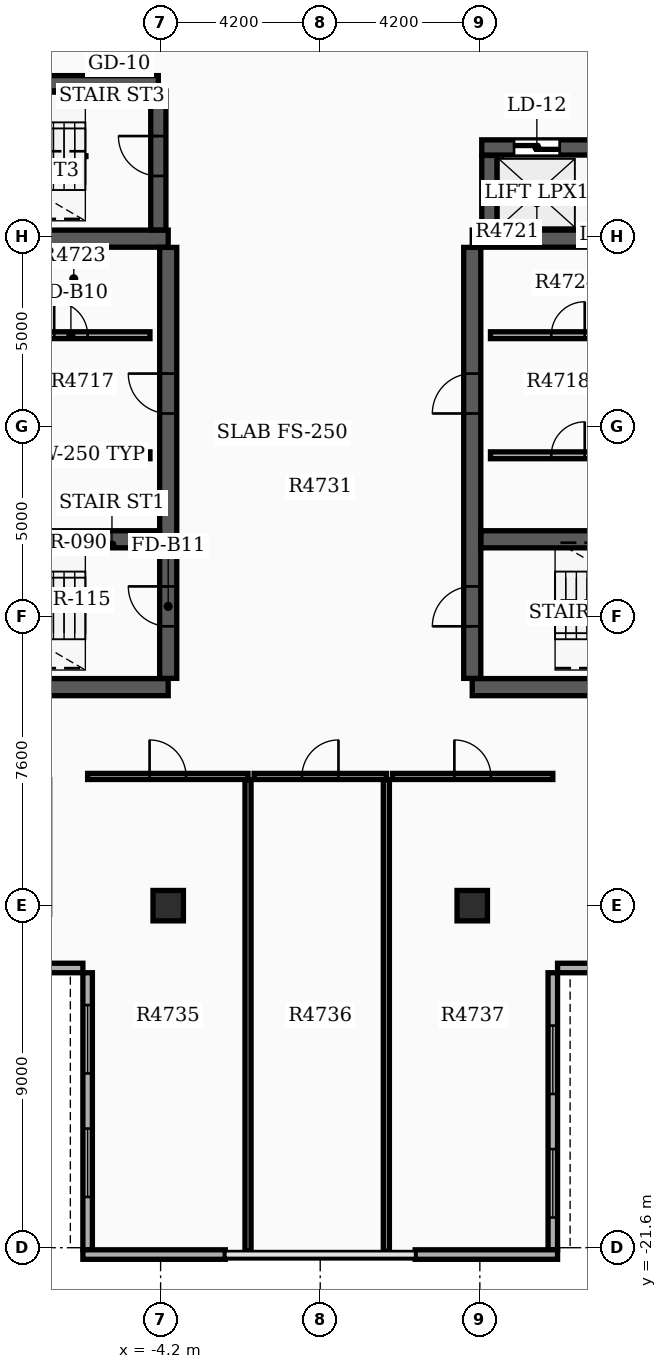
"""IFC4 building model, lengths in metres.
Left out: names, types, materials, properties, quantities, classifications, styles, units other than length and angle.
Written with IfcOpenShell. Run it as: python <this file> out.ifc"""

import sys

from ifc_helpers import new_model, si_unit, direction, frame, frame_2d, origin, origin_2d, place, context, subcontext, project, spatial, rectangle, extrude, element, fill, save


model = new_model("IFC4")
c1 = context("Model", 3, precision=1e-05, world=origin(), true_north=direction((0.0, 1.0)))
c2 = subcontext(c1, "Body", "Model", "MODEL_VIEW")
j1 = project(units=[si_unit("LENGTHUNIT", "METRE"), si_unit("PLANEANGLEUNIT", "RADIAN")], contexts=[c1])
p1 = place(None, origin())
s1 = spatial("IfcSite", under=j1, at=p1, CompositionType="ELEMENT")
p2 = place(p1, origin())
s2 = spatial("IfcBuilding", under=s1, at=p2, CompositionType="ELEMENT")
p3 = place(p2, frame((0.0, 0.0, 308.4)))
s3 = spatial("IfcBuildingStorey", under=s2, at=p3, CompositionType="ELEMENT", Elevation=308.4)
for number, where, z_axis, x_axis in (
    (1, (-12.4, -6.85, 0.0), (0.0, 0.0, 1.0), (1.0, 0.0, 0.0)),
    (2, (-12.4, 4.95, 0.0), (0.0, 0.0, 1.0), (1.0, 0.0, 0.0)),
):
    element("IfcWall", number, at=place(p3, frame(where, z_axis=z_axis, x_axis=x_axis)), inside=s3, PredefinedType="SHEAR", context=c2, shape_type="SweptSolid", body=[
        extrude(rectangle(XDim=8.4, YDim=0.45, at=frame_2d((4.2, 0.0))), origin(), (0.0, 0.0, 1.0), 4.25),
    ])
p4 = place(p3, frame((-4.0, -6.62, 0.0), z_axis=(0.0, 0.0, 1.0), x_axis=(0.0, 1.0, 0.0)))
e3 = element("IfcWall", 3, at=p4, inside=s3, PredefinedType="SHEAR", context=c2, shape_type="SweptSolid", body=[
    extrude(rectangle(XDim=11.34, YDim=0.45, at=frame_2d((5.67, 0.0))), origin(), (0.0, 0.0, 1.0), 4.25),
])
p5 = place(p4, frame((1.37, 0.0, 0.0)))
e4 = element("IfcOpeningElement", 4, at=p5, cuts=e3, PredefinedType="OPENING", context=c2, shape_type="SweptSolid", body=[
    extrude(rectangle(XDim=1.05, YDim=2.15, at=frame_2d((0.525, 1.075))), frame((0.0, 0.235, 0.0), z_axis=(0.0, -1.0, 0.0), x_axis=(1.0, 0.0, 0.0)), (0.0, 0.0, 1.0), 0.47),
])
p6 = place(p4, frame((6.97, 0.0, 0.0)))
e5 = element("IfcOpeningElement", 5, at=p6, cuts=e3, PredefinedType="OPENING", context=c2, shape_type="SweptSolid", body=[
    extrude(rectangle(XDim=1.05, YDim=2.15, at=frame_2d((0.525, 1.075))), frame((0.0, 0.235, 0.0), z_axis=(0.0, -1.0, 0.0), x_axis=(1.0, 0.0, 0.0)), (0.0, 0.0, 1.0), 0.47),
])
p7 = place(p3, frame((-12.17, -2.96, 0.0), z_axis=(0.0, 0.0, 1.0), x_axis=(1.0, 0.0, 0.0)))
e6 = element("IfcWall", 6, at=p7, inside=s3, PredefinedType="SHEAR", context=c2, shape_type="SweptSolid", body=[
    extrude(rectangle(XDim=7.94, YDim=0.45, at=frame_2d((3.97, 0.0))), origin(), (0.0, 0.0, 1.0), 4.25),
])
for number, where, z_axis, x_axis in (
    (7, (4.0, -6.85, 0.0), (0.0, 0.0, 1.0), (1.0, 0.0, 0.0)),
    (8, (4.0, 4.95, 0.0), (0.0, 0.0, 1.0), (1.0, 0.0, 0.0)),
):
    element("IfcWall", number, at=place(p3, frame(where, z_axis=z_axis, x_axis=x_axis)), inside=s3, PredefinedType="SHEAR", context=c2, shape_type="SweptSolid", body=[
        extrude(rectangle(XDim=8.4, YDim=0.45, at=frame_2d((4.2, 0.0))), origin(), (0.0, 0.0, 1.0), 4.25),
    ])
p8 = place(p3, frame((4.0, -6.62, 0.0), z_axis=(0.0, 0.0, 1.0), x_axis=(0.0, 1.0, 0.0)))
e9 = element("IfcWall", 9, at=p8, inside=s3, PredefinedType="SHEAR", context=c2, shape_type="SweptSolid", body=[
    extrude(rectangle(XDim=11.34, YDim=0.45, at=frame_2d((5.67, 0.0))), origin(), (0.0, 0.0, 1.0), 4.25),
])
p9 = place(p8, frame((1.37, 0.0, 0.0)))
e10 = element("IfcOpeningElement", 10, at=p9, cuts=e9, PredefinedType="OPENING", context=c2, shape_type="SweptSolid", body=[
    extrude(rectangle(XDim=1.05, YDim=2.15, at=frame_2d((0.525, 1.075))), frame((0.0, 0.235, 0.0), z_axis=(0.0, -1.0, 0.0), x_axis=(1.0, 0.0, 0.0)), (0.0, 0.0, 1.0), 0.47),
])
p10 = place(p8, frame((6.97, 0.0, 0.0)))
e11 = element("IfcOpeningElement", 11, at=p10, cuts=e9, PredefinedType="OPENING", context=c2, shape_type="SweptSolid", body=[
    extrude(rectangle(XDim=1.05, YDim=2.15, at=frame_2d((0.525, 1.075))), frame((0.0, 0.235, 0.0), z_axis=(0.0, -1.0, 0.0), x_axis=(1.0, 0.0, 0.0)), (0.0, 0.0, 1.0), 0.47),
])
p11 = place(p3, frame((4.23, -2.96, 0.0), z_axis=(0.0, 0.0, 1.0), x_axis=(1.0, 0.0, 0.0)))
e12 = element("IfcWall", 12, at=p11, inside=s3, PredefinedType="SHEAR", context=c2, shape_type="SweptSolid", body=[
    extrude(rectangle(XDim=7.94, YDim=0.45, at=frame_2d((3.97, 0.0))), origin(), (0.0, 0.0, 1.0), 4.25),
])
p12 = place(p3, frame((-12.22, 9.04, 0.0), z_axis=(0.0, 0.0, 1.0), x_axis=(1.0, 0.0, 0.0)))
e13 = element("IfcWall", 13, at=p12, inside=s3, PredefinedType="SHEAR", context=c2, shape_type="SweptSolid", body=[
    extrude(rectangle(XDim=7.96, YDim=0.4, at=frame_2d((3.98, 0.0))), origin(), (0.0, 0.0, 1.0), 4.25),
])
p13 = place(p3, frame((-4.26, 5.18, 0.0), z_axis=(0.0, 0.0, 1.0), x_axis=(0.0, 1.0, 0.0)))
e14 = element("IfcWall", 14, at=p13, inside=s3, PredefinedType="SHEAR", context=c2, shape_type="SweptSolid", body=[
    extrude(rectangle(XDim=3.655, YDim=0.4, at=frame_2d((1.828, 0.0))), origin(), (0.0, 0.0, 1.0), 4.25),
])
p14 = place(p13, frame((1.42, 0.0, 0.0)))
e15 = element("IfcOpeningElement", 15, at=p14, cuts=e14, PredefinedType="OPENING", context=c2, shape_type="SweptSolid", body=[
    extrude(rectangle(XDim=1.05, YDim=2.15, at=frame_2d((0.525, 1.075))), frame((0.0, 0.21, 0.0), z_axis=(0.0, -1.0, 0.0), x_axis=(1.0, 0.0, 0.0)), (0.0, 0.0, 1.0), 0.42),
])
p15 = place(p3, frame((4.45, 5.18, 0.0), z_axis=(0.0, 0.0, 1.0), x_axis=(0.0, 1.0, 0.0)))
e16 = element("IfcWall", 16, at=p15, inside=s3, PredefinedType="SHEAR", context=c2, shape_type="SweptSolid", body=[
    extrude(rectangle(XDim=1.96, YDim=0.4, at=frame_2d((0.98, 0.0))), origin(), (0.0, 0.0, 1.0), 4.25),
])
p16 = place(p3, frame((4.25, 7.35, 0.0), z_axis=(0.0, 0.0, 1.0), x_axis=(1.0, 0.0, 0.0)))
e17 = element("IfcWall", 17, at=p16, inside=s3, PredefinedType="SHEAR", context=c2, shape_type="SweptSolid", body=[
    extrude(rectangle(XDim=5.4, YDim=0.4, at=frame_2d((2.7, 0.0))), origin(), (0.0, 0.0, 1.0), 4.25),
])
p17 = place(p16, frame((0.85, 0.0, 0.0)))
e18 = element("IfcOpeningElement", 18, at=p17, cuts=e17, PredefinedType="OPENING", context=c2, shape_type="SweptSolid", body=[
    extrude(rectangle(XDim=1.2, YDim=2.2, at=frame_2d((0.6, 1.1))), frame((0.0, 0.21, 0.0), z_axis=(0.0, -1.0, 0.0), x_axis=(1.0, 0.0, 0.0)), (0.0, 0.0, 1.0), 0.42),
])
p18 = place(p16, frame((3.25, 0.0, 0.0)))
e19 = element("IfcOpeningElement", 19, at=p18, cuts=e17, PredefinedType="OPENING", context=c2, shape_type="SweptSolid", body=[
    extrude(rectangle(XDim=1.2, YDim=2.2, at=frame_2d((0.6, 1.1))), frame((0.0, 0.21, 0.0), z_axis=(0.0, -1.0, 0.0), x_axis=(1.0, 0.0, 0.0)), (0.0, 0.0, 1.0), 0.42),
])
for number, where, z_axis, x_axis in (
    (20, (-4.0, -12.6, 0.0), (0.0, 0.0, 1.0), (1.0, 0.0, 0.0)),
    (21, (4.0, -12.6, 0.0), (0.0, 0.0, 1.0), (1.0, 0.0, 0.0)),
):
    element("IfcColumn", number, at=place(p3, frame(where, z_axis=z_axis, x_axis=x_axis)), inside=s3, PredefinedType="COLUMN", context=c2, shape_type="SweptSolid", body=[
        extrude(rectangle(XDim=0.8, YDim=0.8, at=origin_2d()), origin(), (0.0, 0.0, 1.0), 4.5),
    ])
p19 = place(p3, frame((-6.12, -14.365, 0.0), z_axis=(0.0, 0.0, 1.0), x_axis=(0.0, -1.0, 0.0)))
e22 = element("IfcWall", 22, at=p19, inside=s3, PredefinedType="STANDARD", context=c2, shape_type="SweptSolid", body=[
    extrude(rectangle(XDim=7.29, YDim=0.25, at=frame_2d((3.645, 0.0))), origin(), (0.0, 0.0, 1.0), 3.73),
])
p20 = place(p19, frame((0.85, 0.0, 0.8)))
e23 = element("IfcOpeningElement", 23, at=p20, cuts=e22, PredefinedType="OPENING", context=c2, shape_type="SweptSolid", body=[
    extrude(rectangle(XDim=1.8, YDim=1.8, at=frame_2d((0.9, 0.9))), frame((0.0, 0.135, 0.0), z_axis=(0.0, -1.0, 0.0), x_axis=(1.0, 0.0, 0.0)), (0.0, 0.0, 1.0), 0.27),
])
p21 = place(p19, frame((4.1, 0.0, 0.8)))
e24 = element("IfcOpeningElement", 24, at=p21, cuts=e22, PredefinedType="OPENING", context=c2, shape_type="SweptSolid", body=[
    extrude(rectangle(XDim=1.8, YDim=1.8, at=frame_2d((0.9, 0.9))), frame((0.0, 0.135, 0.0), z_axis=(0.0, -1.0, 0.0), x_axis=(1.0, 0.0, 0.0)), (0.0, 0.0, 1.0), 0.27),
])
p22 = place(p3, frame((6.12, -21.655, 0.0), z_axis=(0.0, 0.0, 1.0), x_axis=(0.0, 1.0, 0.0)))
e25 = element("IfcWall", 25, at=p22, inside=s3, PredefinedType="STANDARD", context=c2, shape_type="SweptSolid", body=[
    extrude(rectangle(XDim=7.29, YDim=0.25, at=frame_2d((3.645, 0.0))), origin(), (0.0, 0.0, 1.0), 3.73),
])
p23 = place(p22, frame((0.85, 0.0, 0.8)))
e26 = element("IfcOpeningElement", 26, at=p23, cuts=e25, PredefinedType="OPENING", context=c2, shape_type="SweptSolid", body=[
    extrude(rectangle(XDim=1.8, YDim=1.8, at=frame_2d((0.9, 0.9))), frame((0.0, 0.135, 0.0), z_axis=(0.0, -1.0, 0.0), x_axis=(1.0, 0.0, 0.0)), (0.0, 0.0, 1.0), 0.27),
])
p24 = place(p22, frame((4.1, 0.0, 0.8)))
e27 = element("IfcOpeningElement", 27, at=p24, cuts=e25, PredefinedType="OPENING", context=c2, shape_type="SweptSolid", body=[
    extrude(rectangle(XDim=1.8, YDim=1.8, at=frame_2d((0.9, 0.9))), frame((0.0, 0.135, 0.0), z_axis=(0.0, -1.0, 0.0), x_axis=(1.0, 0.0, 0.0)), (0.0, 0.0, 1.0), 0.27),
])
for number, where, z_axis, x_axis in (
    (28, (-6.245, -21.78, 0.0), (0.0, 0.0, 1.0), (1.0, 0.0, 0.0)),
    (29, (2.498, -21.78, 0.0), (0.0, 0.0, 1.0), (1.0, 0.0, 0.0)),
):
    element("IfcWall", number, at=place(p3, frame(where, z_axis=z_axis, x_axis=x_axis)), inside=s3, PredefinedType="STANDARD", context=c2, shape_type="SweptSolid", body=[
        extrude(rectangle(XDim=3.747, YDim=0.25, at=frame_2d((1.874, 0.0))), origin(), (0.0, 0.0, 1.0), 3.73),
    ])
for number, where, z_axis, x_axis in (
    (30, (-12.615, -14.24, 0.0), (0.0, 0.0, 1.0), (1.0, 0.0, 0.0)),
    (31, (12.615, -14.24, 0.0), (0.0, 0.0, 1.0), (-1.0, 0.0, 0.0)),
):
    element("IfcWall", number, at=place(p3, frame(where, z_axis=z_axis, x_axis=x_axis)), inside=s3, PredefinedType="STANDARD", context=c2, shape_type="SweptSolid", body=[
        extrude(rectangle(XDim=6.37, YDim=0.25, at=frame_2d((3.185, 0.0))), origin(), (0.0, 0.0, 1.0), 3.73),
    ])
p25 = place(p3, frame((-11.9, 2.41, 0.0), z_axis=(0.0, 0.0, 1.0), x_axis=(1.0, 0.0, 0.0)))
e32 = element("IfcWall", 32, at=p25, inside=s3, PredefinedType="SOLIDWALL", context=c2, shape_type="SweptSolid", body=[
    extrude(rectangle(XDim=7.42, YDim=0.18, at=frame_2d((3.71, 0.0))), origin(), (0.0, 0.0, 1.0), 3.72),
])
p26 = place(p25, frame((0.55, 0.0, 0.0)))
e33 = element("IfcOpeningElement", 33, at=p26, cuts=e32, PredefinedType="OPENING", context=c2, shape_type="SweptSolid", body=[
    extrude(rectangle(XDim=1.1, YDim=2.15, at=frame_2d((0.55, 1.075))), frame((0.0, 0.1, 0.0), z_axis=(0.0, -1.0, 0.0), x_axis=(1.0, 0.0, 0.0)), (0.0, 0.0, 1.0), 0.2),
])
p27 = place(p25, frame((4.9, 0.0, 0.0)))
e34 = element("IfcOpeningElement", 34, at=p27, cuts=e32, PredefinedType="OPENING", context=c2, shape_type="SweptSolid", body=[
    extrude(rectangle(XDim=0.88, YDim=2.1, at=frame_2d((0.44, 1.05))), frame((0.0, 0.1, 0.0), z_axis=(0.0, -1.0, 0.0), x_axis=(1.0, 0.0, 0.0)), (0.0, 0.0, 1.0), 0.2),
])
p28 = place(p3, frame((4.48, 2.41, 0.0), z_axis=(0.0, 0.0, 1.0), x_axis=(1.0, 0.0, 0.0)))
e35 = element("IfcWall", 35, at=p28, inside=s3, PredefinedType="SOLIDWALL", context=c2, shape_type="SweptSolid", body=[
    extrude(rectangle(XDim=7.42, YDim=0.18, at=frame_2d((3.71, 0.0))), origin(), (0.0, 0.0, 1.0), 3.72),
])
p29 = place(p28, frame((5.67, 0.0, 0.0)))
e36 = element("IfcOpeningElement", 36, at=p29, cuts=e35, PredefinedType="OPENING", context=c2, shape_type="SweptSolid", body=[
    extrude(rectangle(XDim=1.1, YDim=2.15, at=frame_2d((0.55, 1.075))), frame((0.0, 0.1, 0.0), z_axis=(0.0, -1.0, 0.0), x_axis=(1.0, 0.0, 0.0)), (0.0, 0.0, 1.0), 0.2),
])
p30 = place(p28, frame((1.6, 0.0, 0.0)))
e37 = element("IfcOpeningElement", 37, at=p30, cuts=e35, PredefinedType="OPENING", context=c2, shape_type="SweptSolid", body=[
    extrude(rectangle(XDim=0.88, YDim=2.1, at=frame_2d((0.44, 1.05))), frame((0.0, 0.1, 0.0), z_axis=(0.0, -1.0, 0.0), x_axis=(1.0, 0.0, 0.0)), (0.0, 0.0, 1.0), 0.2),
])
p31 = place(p3, frame((-11.9, -0.75, 0.0), z_axis=(0.0, 0.0, 1.0), x_axis=(1.0, 0.0, 0.0)))
e38 = element("IfcWall", 38, at=p31, inside=s3, PredefinedType="SOLIDWALL", context=c2, shape_type="SweptSolid", body=[
    extrude(rectangle(XDim=7.42, YDim=0.18, at=frame_2d((3.71, 0.0))), origin(), (0.0, 0.0, 1.0), 3.72),
])
p32 = place(p31, frame((1.6, 0.0, 0.0)))
e39 = element("IfcOpeningElement", 39, at=p32, cuts=e38, PredefinedType="OPENING", context=c2, shape_type="SweptSolid", body=[
    extrude(rectangle(XDim=0.88, YDim=2.1, at=frame_2d((0.44, 1.05))), frame((0.0, 0.1, 0.0), z_axis=(0.0, -1.0, 0.0), x_axis=(1.0, 0.0, 0.0)), (0.0, 0.0, 1.0), 0.2),
])
p33 = place(p3, frame((4.48, -0.75, 0.0), z_axis=(0.0, 0.0, 1.0), x_axis=(1.0, 0.0, 0.0)))
e40 = element("IfcWall", 40, at=p33, inside=s3, PredefinedType="SOLIDWALL", context=c2, shape_type="SweptSolid", body=[
    extrude(rectangle(XDim=7.42, YDim=0.18, at=frame_2d((3.71, 0.0))), origin(), (0.0, 0.0, 1.0), 3.72),
])
p34 = place(p33, frame((1.6, 0.0, 0.0)))
e41 = element("IfcOpeningElement", 41, at=p34, cuts=e40, PredefinedType="OPENING", context=c2, shape_type="SweptSolid", body=[
    extrude(rectangle(XDim=0.88, YDim=2.1, at=frame_2d((0.44, 1.05))), frame((0.0, 0.1, 0.0), z_axis=(0.0, -1.0, 0.0), x_axis=(1.0, 0.0, 0.0)), (0.0, 0.0, 1.0), 0.2),
])
p35 = place(p3, frame((-6.12, -9.2, 0.0), z_axis=(0.0, 0.0, 1.0), x_axis=(1.0, 0.0, 0.0)))
e42 = element("IfcWall", 42, at=p35, inside=s3, PredefinedType="PARTITIONING", context=c2, shape_type="SweptSolid", body=[
    extrude(rectangle(XDim=4.22, YDim=0.16, at=frame_2d((2.11, 0.0))), origin(), (0.0, 0.0, 1.0), 3.72),
])
p36 = place(p35, frame((1.63, 0.0, 0.0)))
e43 = element("IfcOpeningElement", 43, at=p36, cuts=e42, PredefinedType="OPENING", context=c2, shape_type="SweptSolid", body=[
    extrude(rectangle(XDim=0.96, YDim=2.15, at=frame_2d((0.48, 1.075))), frame((0.0, 0.09, 0.0), z_axis=(0.0, -1.0, 0.0), x_axis=(1.0, 0.0, 0.0)), (0.0, 0.0, 1.0), 0.18),
])
p37 = place(p3, frame((-1.9, -21.695, 0.0), z_axis=(0.0, 0.0, 1.0), x_axis=(0.0, 1.0, 0.0)))
e44 = element("IfcWall", 44, at=p37, inside=s3, PredefinedType="PARTITIONING", context=c2, shape_type="SweptSolid", body=[
    extrude(rectangle(XDim=12.41, YDim=0.16, at=frame_2d((6.205, 0.0))), origin(), (0.0, 0.0, 1.0), 3.72),
])
p38 = place(p3, frame((-1.74, -9.2, 0.0), z_axis=(0.0, 0.0, 1.0), x_axis=(1.0, 0.0, 0.0)))
e45 = element("IfcWall", 45, at=p38, inside=s3, PredefinedType="PARTITIONING", context=c2, shape_type="SweptSolid", body=[
    extrude(rectangle(XDim=3.48, YDim=0.16, at=frame_2d((1.74, 0.0))), origin(), (0.0, 0.0, 1.0), 3.72),
])
p39 = place(p38, frame((1.26, 0.0, 0.0)))
e46 = element("IfcOpeningElement", 46, at=p39, cuts=e45, PredefinedType="OPENING", context=c2, shape_type="SweptSolid", body=[
    extrude(rectangle(XDim=0.96, YDim=2.15, at=frame_2d((0.48, 1.075))), frame((0.0, 0.09, 0.0), z_axis=(0.0, -1.0, 0.0), x_axis=(1.0, 0.0, 0.0)), (0.0, 0.0, 1.0), 0.18),
])
p40 = place(p3, frame((1.74, -21.695, 0.0), z_axis=(0.0, 0.0, 1.0), x_axis=(0.0, 1.0, 0.0)))
e47 = element("IfcWall", 47, at=p40, inside=s3, PredefinedType="PARTITIONING", context=c2, shape_type="SweptSolid", body=[
    extrude(rectangle(XDim=12.41, YDim=0.16, at=frame_2d((6.205, 0.0))), origin(), (0.0, 0.0, 1.0), 3.72),
])
p41 = place(p3, frame((1.9, -9.2, 0.0), z_axis=(0.0, 0.0, 1.0), x_axis=(1.0, 0.0, 0.0)))
e48 = element("IfcWall", 48, at=p41, inside=s3, PredefinedType="PARTITIONING", context=c2, shape_type="SweptSolid", body=[
    extrude(rectangle(XDim=4.22, YDim=0.16, at=frame_2d((2.11, 0.0))), origin(), (0.0, 0.0, 1.0), 3.72),
])
p42 = place(p41, frame((1.63, 0.0, 0.0)))
e49 = element("IfcOpeningElement", 49, at=p42, cuts=e48, PredefinedType="OPENING", context=c2, shape_type="SweptSolid", body=[
    extrude(rectangle(XDim=0.96, YDim=2.15, at=frame_2d((0.48, 1.075))), frame((0.0, 0.09, 0.0), z_axis=(0.0, -1.0, 0.0), x_axis=(1.0, 0.0, 0.0)), (0.0, 0.0, 1.0), 0.18),
])
p43 = place(p20, origin())
e50 = element("IfcWindow", 50, at=p43, inside=s3, PartitioningType="SINGLE_PANEL", PredefinedType="WINDOW", context=c2, shape_type="SweptSolid", body=[
    extrude(rectangle(XDim=1.8, YDim=1.8, at=frame_2d((0.9, 0.9))), frame((0.0, 0.03, 0.0), z_axis=(0.0, -1.0, 0.0), x_axis=(1.0, 0.0, 0.0)), (0.0, 0.0, 1.0), 0.06),
])
fill(e23, e50)
p44 = place(p21, origin())
e51 = element("IfcWindow", 51, at=p44, inside=s3, PartitioningType="SINGLE_PANEL", PredefinedType="WINDOW", context=c2, shape_type="SweptSolid", body=[
    extrude(rectangle(XDim=1.8, YDim=1.8, at=frame_2d((0.9, 0.9))), frame((0.0, 0.03, 0.0), z_axis=(0.0, -1.0, 0.0), x_axis=(1.0, 0.0, 0.0)), (0.0, 0.0, 1.0), 0.06),
])
fill(e24, e51)
p45 = place(p23, origin())
e52 = element("IfcWindow", 52, at=p45, inside=s3, PartitioningType="SINGLE_PANEL", PredefinedType="WINDOW", context=c2, shape_type="SweptSolid", body=[
    extrude(rectangle(XDim=1.8, YDim=1.8, at=frame_2d((0.9, 0.9))), frame((0.0, 0.03, 0.0), z_axis=(0.0, -1.0, 0.0), x_axis=(1.0, 0.0, 0.0)), (0.0, 0.0, 1.0), 0.06),
])
fill(e26, e52)
p46 = place(p24, origin())
e53 = element("IfcWindow", 53, at=p46, inside=s3, PartitioningType="SINGLE_PANEL", PredefinedType="WINDOW", context=c2, shape_type="SweptSolid", body=[
    extrude(rectangle(XDim=1.8, YDim=1.8, at=frame_2d((0.9, 0.9))), frame((0.0, 0.03, 0.0), z_axis=(0.0, -1.0, 0.0), x_axis=(1.0, 0.0, 0.0)), (0.0, 0.0, 1.0), 0.06),
])
fill(e27, e53)
p47 = place(p5, origin())
e54 = element("IfcDoor", 54, at=p47, inside=s3, OperationType="SINGLE_SWING_RIGHT", PredefinedType="DOOR", context=c2, shape_type="SweptSolid", body=[
    extrude(rectangle(XDim=1.05, YDim=2.15, at=frame_2d((0.525, 1.075))), frame((0.0, 0.025, 0.0), z_axis=(0.0, -1.0, 0.0), x_axis=(1.0, 0.0, 0.0)), (0.0, 0.0, 1.0), 0.05),
])
fill(e4, e54)
p48 = place(p9, origin())
e55 = element("IfcDoor", 55, at=p48, inside=s3, OperationType="SINGLE_SWING_LEFT", PredefinedType="DOOR", context=c2, shape_type="SweptSolid", body=[
    extrude(rectangle(XDim=1.05, YDim=2.15, at=frame_2d((0.525, 1.075))), frame((0.0, 0.025, 0.0), z_axis=(0.0, -1.0, 0.0), x_axis=(1.0, 0.0, 0.0)), (0.0, 0.0, 1.0), 0.05),
])
fill(e10, e55)
p49 = place(p6, origin())
e56 = element("IfcDoor", 56, at=p49, inside=s3, OperationType="SINGLE_SWING_RIGHT", PredefinedType="DOOR", context=c2, shape_type="SweptSolid", body=[
    extrude(rectangle(XDim=1.05, YDim=2.15, at=frame_2d((0.525, 1.075))), frame((0.0, 0.025, 0.0), z_axis=(0.0, -1.0, 0.0), x_axis=(1.0, 0.0, 0.0)), (0.0, 0.0, 1.0), 0.05),
])
fill(e5, e56)
p50 = place(p10, origin())
e57 = element("IfcDoor", 57, at=p50, inside=s3, OperationType="SINGLE_SWING_LEFT", PredefinedType="DOOR", context=c2, shape_type="SweptSolid", body=[
    extrude(rectangle(XDim=1.05, YDim=2.15, at=frame_2d((0.525, 1.075))), frame((0.0, 0.025, 0.0), z_axis=(0.0, -1.0, 0.0), x_axis=(1.0, 0.0, 0.0)), (0.0, 0.0, 1.0), 0.05),
])
fill(e11, e57)
p51 = place(p14, origin())
e58 = element("IfcDoor", 58, at=p51, inside=s3, OperationType="SINGLE_SWING_RIGHT", PredefinedType="DOOR", context=c2, shape_type="SweptSolid", body=[
    extrude(rectangle(XDim=1.05, YDim=2.15, at=frame_2d((0.525, 1.075))), frame((0.0, 0.025, 0.0), z_axis=(0.0, -1.0, 0.0), x_axis=(1.0, 0.0, 0.0)), (0.0, 0.0, 1.0), 0.05),
])
fill(e15, e58)
p52 = place(p17, origin())
e59 = element("IfcDoor", 59, at=p52, inside=s3, OperationType="DOUBLE_DOOR_SLIDING", PredefinedType="DOOR", context=c2, shape_type="SweptSolid", body=[
    extrude(rectangle(XDim=1.2, YDim=2.2, at=frame_2d((0.6, 1.1))), frame((0.0, 0.025, 0.0), z_axis=(0.0, -1.0, 0.0), x_axis=(1.0, 0.0, 0.0)), (0.0, 0.0, 1.0), 0.05),
])
fill(e18, e59)
p53 = place(p27, origin())
e60 = element("IfcDoor", 60, at=p53, inside=s3, OperationType="SINGLE_SWING_LEFT", PredefinedType="DOOR", context=c2, shape_type="SweptSolid", body=[
    extrude(rectangle(XDim=0.88, YDim=2.1, at=frame_2d((0.44, 1.05))), frame((0.0, 0.025, 0.0), z_axis=(0.0, -1.0, 0.0), x_axis=(1.0, 0.0, 0.0)), (0.0, 0.0, 1.0), 0.05),
])
fill(e34, e60)
p54 = place(p30, origin())
e61 = element("IfcDoor", 61, at=p54, inside=s3, OperationType="SINGLE_SWING_RIGHT", PredefinedType="DOOR", context=c2, shape_type="SweptSolid", body=[
    extrude(rectangle(XDim=0.88, YDim=2.1, at=frame_2d((0.44, 1.05))), frame((0.0, 0.025, 0.0), z_axis=(0.0, -1.0, 0.0), x_axis=(1.0, 0.0, 0.0)), (0.0, 0.0, 1.0), 0.05),
])
fill(e37, e61)
p55 = place(p34, origin())
e62 = element("IfcDoor", 62, at=p55, inside=s3, OperationType="SINGLE_SWING_RIGHT", PredefinedType="DOOR", context=c2, shape_type="SweptSolid", body=[
    extrude(rectangle(XDim=0.88, YDim=2.1, at=frame_2d((0.44, 1.05))), frame((0.0, 0.025, 0.0), z_axis=(0.0, -1.0, 0.0), x_axis=(1.0, 0.0, 0.0)), (0.0, 0.0, 1.0), 0.05),
])
fill(e41, e62)
p56 = place(p36, origin())
e63 = element("IfcDoor", 63, at=p56, inside=s3, OperationType="SINGLE_SWING_LEFT", PredefinedType="DOOR", context=c2, shape_type="SweptSolid", body=[
    extrude(rectangle(XDim=0.96, YDim=2.15, at=frame_2d((0.48, 1.075))), frame((0.0, 0.025, 0.0), z_axis=(0.0, -1.0, 0.0), x_axis=(1.0, 0.0, 0.0)), (0.0, 0.0, 1.0), 0.05),
])
fill(e43, e63)
p57 = place(p39, origin())
e64 = element("IfcDoor", 64, at=p57, inside=s3, OperationType="SINGLE_SWING_RIGHT", PredefinedType="DOOR", context=c2, shape_type="SweptSolid", body=[
    extrude(rectangle(XDim=0.96, YDim=2.15, at=frame_2d((0.48, 1.075))), frame((0.0, 0.025, 0.0), z_axis=(0.0, -1.0, 0.0), x_axis=(1.0, 0.0, 0.0)), (0.0, 0.0, 1.0), 0.05),
])
fill(e46, e64)
p58 = place(p42, origin())
e65 = element("IfcDoor", 65, at=p58, inside=s3, OperationType="SINGLE_SWING_LEFT", PredefinedType="DOOR", context=c2, shape_type="SweptSolid", body=[
    extrude(rectangle(XDim=0.96, YDim=2.15, at=frame_2d((0.48, 1.075))), frame((0.0, 0.025, 0.0), z_axis=(0.0, -1.0, 0.0), x_axis=(1.0, 0.0, 0.0)), (0.0, 0.0, 1.0), 0.05),
])
fill(e49, e65)
save(model, sys.argv[1])
